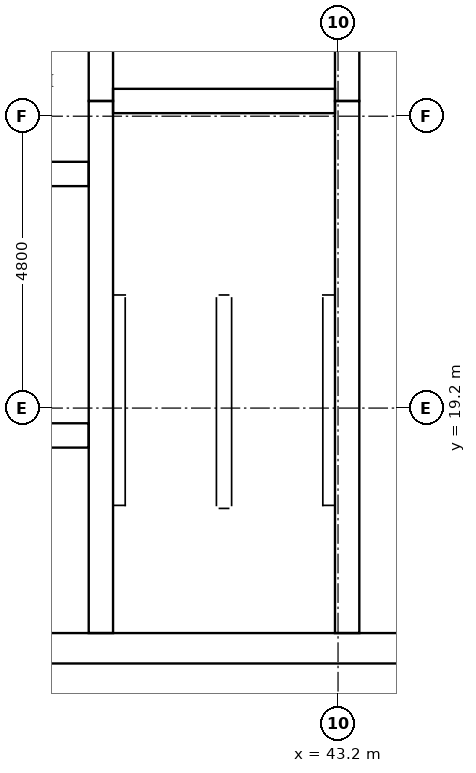
"""IFC4 building model, lengths in metres.
Left out: names, types, materials, properties, quantities, classifications, styles, units other than length and angle.
Written with IfcOpenShell. Run it as: python <this file> out.ifc"""

import sys

from ifc_helpers import new_model, si_unit, direction, frame, frame_2d, origin, place, context, subcontext, project, spatial, rectangle, extrude, element, fill, save


model = new_model("IFC4")
c1 = context("Model", 3, precision=1e-05, world=origin(), true_north=direction((0.0, 1.0)))
c2 = subcontext(c1, "Body", "Model", "MODEL_VIEW")
j1 = project(units=[si_unit("LENGTHUNIT", "METRE"), si_unit("PLANEANGLEUNIT", "RADIAN")], contexts=[c1])
p1 = place(None, origin())
s1 = spatial("IfcSite", under=j1, at=p1, CompositionType="ELEMENT")
p2 = place(p1, origin())
s2 = spatial("IfcBuilding", under=s1, at=p2, CompositionType="ELEMENT")
p3 = place(p2, frame((0.0, 0.0, 310.1)))
s3 = spatial("IfcBuildingStorey", under=s2, at=p3, CompositionType="ELEMENT", Elevation=310.1)
p4 = place(p3, frame((15.0, 15.25, 0.0), z_axis=(0.0, 0.0, 1.0), x_axis=(1.0, 0.0, 0.0)))
e1 = element("IfcWall", 1, at=p4, inside=s3, PredefinedType="SHEAR", context=c2, shape_type="SweptSolid", body=[
    extrude(rectangle(XDim=32.4, YDim=0.5, at=frame_2d((16.2, 0.0))), origin(), (0.0, 0.0, 1.0), 3.8),
])
p5 = place(p4, frame((15.3, 0.0, 0.0)))
e2 = element("IfcOpeningElement", 2, at=p5, cuts=e1, PredefinedType="OPENING", context=c2, shape_type="SweptSolid", body=[
    extrude(rectangle(XDim=1.8, YDim=2.1, at=frame_2d((0.9, 1.05))), frame((0.0, 0.26, 0.0), z_axis=(0.0, -1.0, 0.0), x_axis=(1.0, 0.0, 0.0)), (0.0, 0.0, 1.0), 0.52),
])
p6 = place(p3, frame((39.3, 15.5, 0.0), z_axis=(0.0, 0.0, 1.0), x_axis=(0.0, 1.0, 0.0)))
e3 = element("IfcWall", 3, at=p6, inside=s3, PredefinedType="SHEAR", context=c2, shape_type="SweptSolid", body=[
    extrude(rectangle(XDim=8.75, YDim=0.4, at=frame_2d((4.375, 0.0))), origin(), (0.0, 0.0, 1.0), 3.8),
])
p7 = place(p3, frame((39.3, 24.25, 0.0), z_axis=(0.0, 0.0, 1.0), x_axis=(0.0, 1.0, 0.0)))
e4 = element("IfcWall", 4, at=p7, inside=s3, PredefinedType="SHEAR", context=c2, shape_type="SweptSolid", body=[
    extrude(rectangle(XDim=3.5, YDim=0.4, at=frame_2d((1.75, 0.0))), origin(), (0.0, 0.0, 1.0), 3.8),
])
p8 = place(p3, frame((43.35, 15.5, 0.0), z_axis=(0.0, 0.0, 1.0), x_axis=(0.0, 1.0, 0.0)))
e5 = element("IfcWall", 5, at=p8, inside=s3, PredefinedType="SHEAR", context=c2, shape_type="SweptSolid", body=[
    extrude(rectangle(XDim=8.75, YDim=0.4, at=frame_2d((4.375, 0.0))), origin(), (0.0, 0.0, 1.0), 3.8),
])
p9 = place(p8, frame((0.7, 0.0, 0.0)))
e6 = element("IfcOpeningElement", 6, at=p9, cuts=e5, PredefinedType="OPENING", context=c2, shape_type="SweptSolid", body=[
    extrude(rectangle(XDim=1.2, YDim=2.1, at=frame_2d((0.6, 1.05))), frame((0.0, 0.21, 0.0), z_axis=(0.0, -1.0, 0.0), x_axis=(1.0, 0.0, 0.0)), (0.0, 0.0, 1.0), 0.42),
])
p10 = place(p3, frame((43.35, 24.25, 0.0), z_axis=(0.0, 0.0, 1.0), x_axis=(0.0, 1.0, 0.0)))
e7 = element("IfcWall", 7, at=p10, inside=s3, PredefinedType="SHEAR", context=c2, shape_type="SweptSolid", body=[
    extrude(rectangle(XDim=3.5, YDim=0.4, at=frame_2d((1.75, 0.0))), origin(), (0.0, 0.0, 1.0), 3.8),
])
p11 = place(p10, frame((1.2, 0.0, 0.0)))
e8 = element("IfcOpeningElement", 8, at=p11, cuts=e7, PredefinedType="OPENING", context=c2, shape_type="SweptSolid", body=[
    extrude(rectangle(XDim=1.1, YDim=2.1, at=frame_2d((0.55, 1.05))), frame((0.0, 0.21, 0.0), z_axis=(0.0, -1.0, 0.0), x_axis=(1.0, 0.0, 0.0)), (0.0, 0.0, 1.0), 0.42),
])
p12 = place(p3, frame((39.5, 24.25, 0.0), z_axis=(0.0, 0.0, 1.0), x_axis=(1.0, 0.0, 0.0)))
e9 = element("IfcWall", 9, at=p12, inside=s3, PredefinedType="SHEAR", context=c2, shape_type="SweptSolid", body=[
    extrude(rectangle(XDim=3.65, YDim=0.4, at=frame_2d((1.825, 0.0))), origin(), (0.0, 0.0, 1.0), 3.8),
])
p13 = place(p3, frame((33.5, 18.75, 0.0), z_axis=(0.0, 0.0, 1.0), x_axis=(1.0, 0.0, 0.0)))
e10 = element("IfcWall", 10, at=p13, inside=s3, PredefinedType="SHEAR", context=c2, shape_type="SweptSolid", body=[
    extrude(rectangle(XDim=5.6, YDim=0.4, at=frame_2d((2.8, 0.0))), origin(), (0.0, 0.0, 1.0), 3.8),
])
p14 = place(p13, frame((1.384, 0.0, 0.0)))
e11 = element("IfcOpeningElement", 11, at=p14, cuts=e10, PredefinedType="OPENING", context=c2, shape_type="SweptSolid", body=[
    extrude(rectangle(XDim=1.0, YDim=2.1, at=frame_2d((0.5, 1.05))), frame((0.0, 0.21, 0.0), z_axis=(0.0, -1.0, 0.0), x_axis=(1.0, 0.0, 0.0)), (0.0, 0.0, 1.0), 0.42),
])
p15 = place(p13, frame((4.084, 0.0, 0.0)))
e12 = element("IfcOpeningElement", 12, at=p15, cuts=e10, PredefinedType="OPENING", context=c2, shape_type="SweptSolid", body=[
    extrude(rectangle(XDim=1.0, YDim=2.1, at=frame_2d((0.5, 1.05))), frame((0.0, 0.21, 0.0), z_axis=(0.0, -1.0, 0.0), x_axis=(1.0, 0.0, 0.0)), (0.0, 0.0, 1.0), 0.42),
])
p16 = place(p3, frame((23.3, 23.05, 0.0), z_axis=(0.0, 0.0, 1.0), x_axis=(1.0, 0.0, 0.0)))
e13 = element("IfcWall", 13, at=p16, inside=s3, PredefinedType="SHEAR", context=c2, shape_type="SweptSolid", body=[
    extrude(rectangle(XDim=15.8, YDim=0.4, at=frame_2d((7.9, 0.0))), origin(), (0.0, 0.0, 1.0), 3.8),
])
p17 = place(p16, frame((1.662, 0.0, 0.0)))
e14 = element("IfcOpeningElement", 14, at=p17, cuts=e13, PredefinedType="OPENING", context=c2, shape_type="SweptSolid", body=[
    extrude(rectangle(XDim=1.0, YDim=2.1, at=frame_2d((0.5, 1.05))), frame((0.0, 0.21, 0.0), z_axis=(0.0, -1.0, 0.0), x_axis=(1.0, 0.0, 0.0)), (0.0, 0.0, 1.0), 0.42),
])
p18 = place(p16, frame((5.662, 0.0, 0.0)))
e15 = element("IfcOpeningElement", 15, at=p18, cuts=e13, PredefinedType="OPENING", context=c2, shape_type="SweptSolid", body=[
    extrude(rectangle(XDim=1.0, YDim=2.1, at=frame_2d((0.5, 1.05))), frame((0.0, 0.21, 0.0), z_axis=(0.0, -1.0, 0.0), x_axis=(1.0, 0.0, 0.0)), (0.0, 0.0, 1.0), 0.42),
])
p19 = place(p16, frame((9.612, 0.0, 0.0)))
e16 = element("IfcOpeningElement", 16, at=p19, cuts=e13, PredefinedType="OPENING", context=c2, shape_type="SweptSolid", body=[
    extrude(rectangle(XDim=1.0, YDim=2.1, at=frame_2d((0.5, 1.05))), frame((0.0, 0.21, 0.0), z_axis=(0.0, -1.0, 0.0), x_axis=(1.0, 0.0, 0.0)), (0.0, 0.0, 1.0), 0.42),
])
p20 = place(p16, frame((13.612, 0.0, 0.0)))
e17 = element("IfcOpeningElement", 17, at=p20, cuts=e13, PredefinedType="OPENING", context=c2, shape_type="SweptSolid", body=[
    extrude(rectangle(XDim=1.0, YDim=2.1, at=frame_2d((0.5, 1.05))), frame((0.0, 0.21, 0.0), z_axis=(0.0, -1.0, 0.0), x_axis=(1.0, 0.0, 0.0)), (0.0, 0.0, 1.0), 0.42),
])
p21 = place(p9, origin())
e18 = element("IfcDoor", 18, at=p21, inside=s3, OperationType="SINGLE_SWING_LEFT", PredefinedType="DOOR", context=c2, shape_type="SweptSolid", body=[
    extrude(rectangle(XDim=1.2, YDim=2.1, at=frame_2d((0.6, 1.05))), frame((0.0, 0.025, 0.0), z_axis=(0.0, -1.0, 0.0), x_axis=(1.0, 0.0, 0.0)), (0.0, 0.0, 1.0), 0.05),
])
fill(e6, e18)
p22 = place(p15, origin())
e19 = element("IfcDoor", 19, at=p22, inside=s3, OperationType="SINGLE_SWING_RIGHT", PredefinedType="DOOR", context=c2, shape_type="SweptSolid", body=[
    extrude(rectangle(XDim=1.0, YDim=2.1, at=frame_2d((0.5, 1.05))), frame((0.0, 0.025, 0.0), z_axis=(0.0, -1.0, 0.0), x_axis=(1.0, 0.0, 0.0)), (0.0, 0.0, 1.0), 0.05),
])
fill(e12, e19)
save(model, sys.argv[1])
